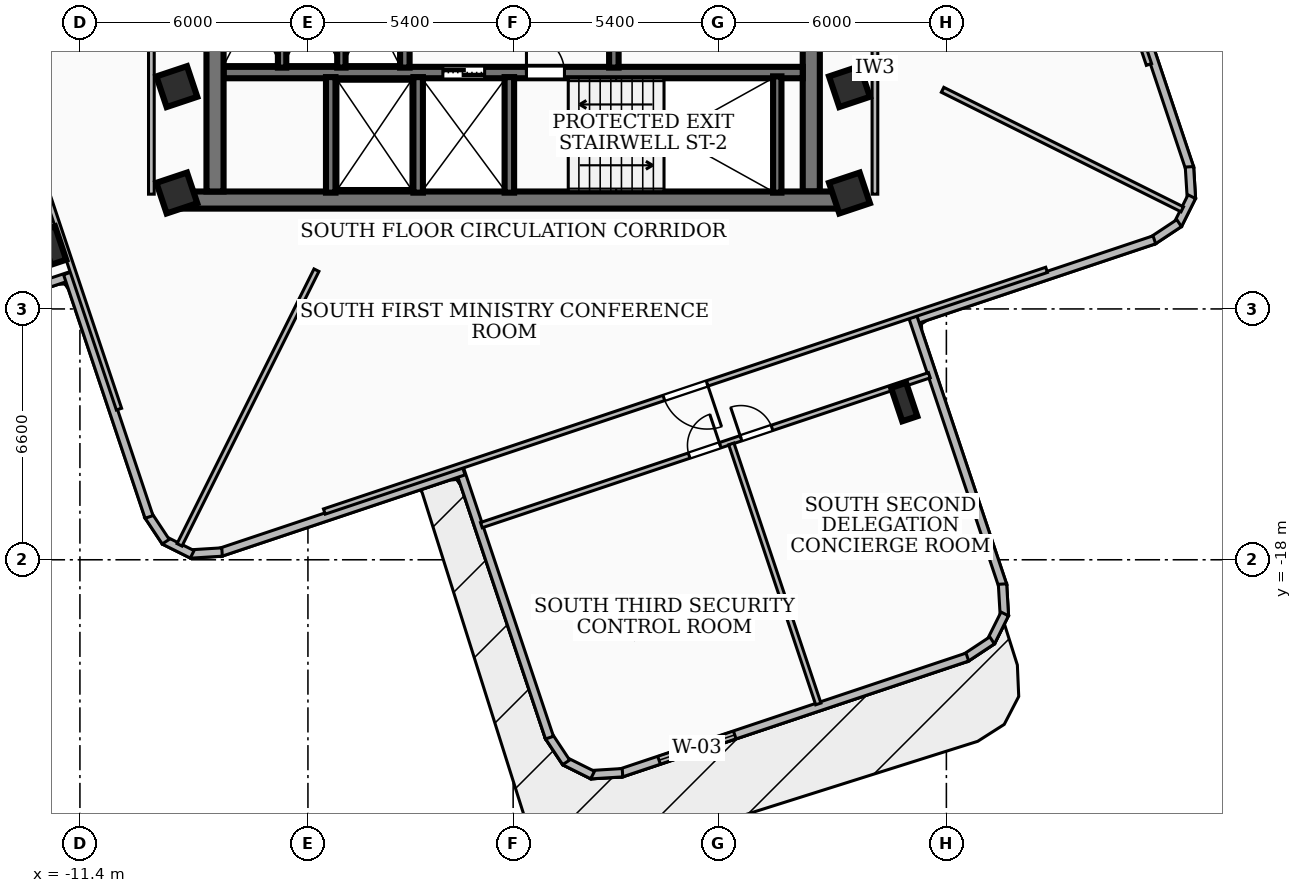
"""IFC4 building model, lengths in metres.
Left out: names, types, materials, properties, quantities, classifications, styles, units other than length and angle.
Written with IfcOpenShell. Run it as: python <this file> out.ifc"""

import sys

from ifc_helpers import new_model, si_unit, direction, frame, frame_2d, origin, origin_2d, place, context, subcontext, project, spatial, rectangle, i_section, extrude, element, fill, save


model = new_model("IFC4")
c1 = context("Model", 3, precision=1e-05, world=origin(), true_north=direction((0.0, 1.0)))
c2 = subcontext(c1, "Body", "Model", "MODEL_VIEW")
j1 = project(units=[si_unit("LENGTHUNIT", "METRE"), si_unit("PLANEANGLEUNIT", "RADIAN")], contexts=[c1])
p1 = place(None, origin())
s1 = spatial("IfcSite", under=j1, at=p1, CompositionType="ELEMENT")
p2 = place(p1, origin())
s2 = spatial("IfcBuilding", under=s1, at=p2, CompositionType="ELEMENT")
p3 = place(p2, frame((0.0, 0.0, 155.88)))
s3 = spatial("IfcBuildingStorey", under=s2, at=p3, CompositionType="ELEMENT", Elevation=155.88)
p4 = place(p3, frame((8.78, -8.535, 0.0), z_axis=(0.0, 0.0, 1.0), x_axis=(-1.0, 0.0, 0.0)))
e1 = element("IfcWall", 1, at=p4, inside=s3, PredefinedType="SHEAR", context=c2, shape_type="SweptSolid", body=[
    extrude(rectangle(XDim=17.56, YDim=0.45, at=frame_2d((8.78, 0.0))), origin(), (0.0, 0.0, 1.0), 3.34),
])
for number, where, z_axis, x_axis in (
    (2, (-7.845, -8.31, 0.0), (0.0, 0.0, 1.0), (0.0, 1.0, 0.0)),
    (3, (7.845, -1.975, 0.0), (0.0, 0.0, 1.0), (0.0, -1.0, 0.0)),
):
    element("IfcWall", number, at=place(p3, frame(where, z_axis=z_axis, x_axis=x_axis)), inside=s3, PredefinedType="SHEAR", context=c2, shape_type="SweptSolid", body=[
        extrude(rectangle(XDim=6.335, YDim=0.45, at=frame_2d((3.167, 0.0))), origin(), (0.0, 0.0, 1.0), 3.34),
    ])
p5 = place(p3, frame((-7.62, -5.18, 0.0), z_axis=(0.0, 0.0, 1.0), x_axis=(1.0, 0.0, 0.0)))
e4 = element("IfcWall", 4, at=p5, inside=s3, PredefinedType="SOLIDWALL", context=c2, shape_type="SweptSolid", body=[
    extrude(rectangle(XDim=15.24, YDim=0.3, at=frame_2d((7.62, 0.0))), origin(), (0.0, 0.0, 1.0), 3.34),
])
p6 = place(p5, frame((5.77, 0.0, 0.0)))
e5 = element("IfcOpeningElement", 5, at=p6, cuts=e4, PredefinedType="OPENING", context=c2, shape_type="SweptSolid", body=[
    extrude(rectangle(XDim=1.1, YDim=2.15, at=frame_2d((0.55, 1.075))), frame((0.0, 0.16, 0.0), z_axis=(0.0, -1.0, 0.0), x_axis=(1.0, 0.0, 0.0)), (0.0, 0.0, 1.0), 0.32),
])
p7 = place(p5, frame((7.97, 0.0, 0.0)))
e6 = element("IfcOpeningElement", 6, at=p7, cuts=e4, PredefinedType="OPENING", context=c2, shape_type="SweptSolid", body=[
    extrude(rectangle(XDim=1.0, YDim=2.1, at=frame_2d((0.5, 1.05))), frame((0.0, 0.16, 0.0), z_axis=(0.0, -1.0, 0.0), x_axis=(1.0, 0.0, 0.0)), (0.0, 0.0, 1.0), 0.32),
])
p8 = place(p3, frame((6.95, -8.34, 0.0), z_axis=(0.0, 0.0, 1.0), x_axis=(0.0, 1.0, 0.0)))
e7 = element("IfcWall", 7, at=p8, inside=s3, PredefinedType="SOLIDWALL", context=c2, shape_type="SweptSolid", body=[
    extrude(rectangle(XDim=3.06, YDim=0.22, at=frame_2d((1.53, 0.0))), origin(), (0.0, 0.0, 1.0), 3.34),
])
for number, where, z_axis, x_axis in (
    (8, (-0.1, -8.34, 0.0), (0.0, 0.0, 1.0), (0.0, 1.0, 0.0)),
    (9, (-2.5, -8.34, 0.0), (0.0, 0.0, 1.0), (0.0, 1.0, 0.0)),
    (10, (-4.8, -8.34, 0.0), (0.0, 0.0, 1.0), (0.0, 1.0, 0.0)),
):
    element("IfcWall", number, at=place(p3, frame(where, z_axis=z_axis, x_axis=x_axis)), inside=s3, PredefinedType="SOLIDWALL", context=c2, shape_type="SweptSolid", body=[
        extrude(rectangle(XDim=3.04, YDim=0.25, at=frame_2d((1.52, 0.0))), origin(), (0.0, 0.0, 1.0), 3.34),
    ])
for number, where, z_axis, x_axis in (
    (11, (-2.85, -5.05, 0.0), (0.0, 0.0, 1.0), (0.0, 1.0, 0.0)),
    (12, (2.65, -5.05, 0.0), (0.0, 0.0, 1.0), (0.0, 1.0, 0.0)),
):
    element("IfcWall", number, at=place(p3, frame(where, z_axis=z_axis, x_axis=x_axis)), inside=s3, PredefinedType="SOLIDWALL", context=c2, shape_type="SweptSolid", body=[
        extrude(rectangle(XDim=3.07, YDim=0.25, at=frame_2d((1.535, 0.0))), origin(), (0.0, 0.0, 1.0), 3.34),
    ])
for number, where, z_axis, x_axis in (
    (13, (-6.08, -5.05, 0.0), (0.0, 0.0, 1.0), (0.0, 1.0, 0.0)),
    (14, (-4.52, -5.05, 0.0), (0.0, 0.0, 1.0), (0.0, 1.0, 0.0)),
):
    element("IfcWall", number, at=place(p3, frame(where, z_axis=z_axis, x_axis=x_axis)), inside=s3, PredefinedType="SOLIDWALL", context=c2, shape_type="SweptSolid", body=[
        extrude(rectangle(XDim=3.07, YDim=0.22, at=frame_2d((1.535, 0.0))), origin(), (0.0, 0.0, 1.0), 3.34),
    ])
for number, where, z_axis, x_axis in (
    (15, (-8.85, -5.55, 0.0), (0.0, 0.0, 1.0), (0.948, 0.317, 0.0)),
    (16, (8.85, -5.55, 0.0), (0.0, 0.0, 1.0), (0.948, 0.317, 0.0)),
    (17, (8.85, -8.35, 0.0), (0.0, 0.0, 1.0), (0.948, 0.317, 0.0)),
    (18, (-8.85, -8.35, 0.0), (0.0, 0.0, 1.0), (0.948, 0.317, 0.0)),
):
    element("IfcColumn", number, at=place(p3, frame(where, z_axis=z_axis, x_axis=x_axis)), inside=s3, PredefinedType="COLUMN", context=c2, shape_type="SweptSolid", body=[
        extrude(rectangle(XDim=0.85, YDim=0.85, at=origin_2d()), origin(), (0.0, 0.0, 1.0), 3.6),
    ])
for number, where, z_axis, x_axis in (
    (19, (-12.106, -9.731, 0.0), (0.0, 0.0, 1.0), (0.948, 0.317, 0.0)),
    (20, (3.29, -19.536, 0.0), (0.0, 0.0, 1.0), (0.948, 0.317, 0.0)),
    (21, (10.29, -13.85, 0.0), (0.0, 0.0, 1.0), (0.948, 0.317, 0.0)),
):
    element("IfcColumn", number, at=place(p3, frame(where, z_axis=z_axis, x_axis=x_axis)), inside=s3, PredefinedType="COLUMN", context=c2, shape_type="SweptSolid", body=[
        extrude(i_section(OverallWidth=0.418, OverallDepth=0.927, WebThickness=0.019, FlangeThickness=0.032, at=origin_2d()), origin(), (0.0, 0.0, 1.0), 3.6),
    ])
p9 = place(p3, frame((-11.615, -10.519, 0.0), z_axis=(0.0, 0.0, 1.0), x_axis=(-0.948329626758, -0.317286808759, 0.0)))
e22 = element("IfcWall", 22, at=p9, inside=s3, PredefinedType="SOLIDWALL", context=c2, shape_type="SweptSolid", body=[
    extrude(rectangle(XDim=9.058, YDim=0.22, at=frame_2d((4.529, 0.0))), origin(), (0.0, 0.0, 1.0), 3.34),
])
p10 = place(p9, frame((5.258, 0.0, 0.85)))
e23 = element("IfcOpeningElement", 23, at=p10, cuts=e22, PredefinedType="OPENING", context=c2, shape_type="SweptSolid", body=[
    extrude(rectangle(XDim=2.7, YDim=2.1, at=frame_2d((1.35, 1.05))), frame((0.0, 0.12, 0.0), z_axis=(0.0, -1.0, 0.0), x_axis=(1.0, 0.0, 0.0)), (0.0, 0.0, 1.0), 0.24),
])
p11 = place(p3, frame((15.662, -1.3, 0.0), z_axis=(0.0, 0.0, 1.0), x_axis=(0.317224676093, -0.948350412494, 0.0)))
e24 = element("IfcWall", 24, at=p11, inside=s3, PredefinedType="SOLIDWALL", context=c2, shape_type="SweptSolid", body=[
    extrude(rectangle(XDim=6.758, YDim=0.22, at=frame_2d((3.379, 0.0))), origin(), (0.0, 0.0, 1.0), 3.34),
])
p12 = place(p3, frame((17.796, -7.66, 0.0), z_axis=(0.0, 0.0, 1.0), x_axis=(0.062305442082, -0.998057128569, 0.0)))
e25 = element("IfcWall", 25, at=p12, inside=s3, PredefinedType="SOLIDWALL", context=c2, shape_type="SweptSolid", body=[
    extrude(rectangle(XDim=0.835, YDim=0.22, at=frame_2d((0.417, 0.0))), origin(), (0.0, 0.0, 1.0), 3.34),
])
p13 = place(p3, frame((17.857, -8.446, 0.0), z_axis=(0.0, 0.0, 1.0), x_axis=(-0.446258139106, -0.894904281631, 0.0)))
e26 = element("IfcWall", 26, at=p13, inside=s3, PredefinedType="SOLIDWALL", context=c2, shape_type="SweptSolid", body=[
    extrude(rectangle(XDim=0.818, YDim=0.22, at=frame_2d((0.409, 0.0))), origin(), (0.0, 0.0, 1.0), 3.34),
])
p14 = place(p3, frame((17.524, -9.142, 0.0), z_axis=(0.0, 0.0, 1.0), x_axis=(-0.833756011094, -0.552133058206, 0.0)))
e27 = element("IfcWall", 27, at=p14, inside=s3, PredefinedType="SOLIDWALL", context=c2, shape_type="SweptSolid", body=[
    extrude(rectangle(XDim=0.835, YDim=0.22, at=frame_2d((0.417, 0.0))), origin(), (0.0, 0.0, 1.0), 3.34),
])
p15 = place(p3, frame((16.873, -9.581, 0.0), z_axis=(0.0, 0.0, 1.0), x_axis=(-0.94829606055, -0.317387116224, 0.0)))
e28 = element("IfcWall", 28, at=p15, inside=s3, PredefinedType="SOLIDWALL", context=c2, shape_type="SweptSolid", body=[
    extrude(rectangle(XDim=6.758, YDim=0.22, at=frame_2d((3.379, 0.0))), origin(), (0.0, 0.0, 1.0), 3.34),
])
p16 = place(p3, frame((10.519, -11.615, 0.0), z_axis=(0.0, 0.0, 1.0), x_axis=(0.317347016501, -0.948309480664, 0.0)))
e29 = element("IfcWall", 29, at=p16, inside=s3, PredefinedType="SOLIDWALL", context=c2, shape_type="SweptSolid", body=[
    extrude(rectangle(XDim=7.458, YDim=0.22, at=frame_2d((3.729, 0.0))), origin(), (0.0, 0.0, 1.0), 3.34),
])
p17 = place(p3, frame((12.877, -18.639, 0.0), z_axis=(0.0, 0.0, 1.0), x_axis=(0.05880777677, -0.998269325078, 0.0)))
e30 = element("IfcWall", 30, at=p17, inside=s3, PredefinedType="SOLIDWALL", context=c2, shape_type="SweptSolid", body=[
    extrude(rectangle(XDim=0.834, YDim=0.22, at=frame_2d((0.417, 0.0))), origin(), (0.0, 0.0, 1.0), 3.34),
])
p18 = place(p3, frame((12.936, -19.425, 0.0), z_axis=(0.0, 0.0, 1.0), x_axis=(-0.446258139106, -0.894904281631, 0.0)))
e31 = element("IfcWall", 31, at=p18, inside=s3, PredefinedType="SOLIDWALL", context=c2, shape_type="SweptSolid", body=[
    extrude(rectangle(XDim=0.818, YDim=0.22, at=frame_2d((0.409, 0.0))), origin(), (0.0, 0.0, 1.0), 3.34),
])
p19 = place(p3, frame((12.603, -20.121, 0.0), z_axis=(0.0, 0.0, 1.0), x_axis=(-0.833756011094, -0.552133058206, 0.0)))
e32 = element("IfcWall", 32, at=p19, inside=s3, PredefinedType="SOLIDWALL", context=c2, shape_type="SweptSolid", body=[
    extrude(rectangle(XDim=0.835, YDim=0.22, at=frame_2d((0.417, 0.0))), origin(), (0.0, 0.0, 1.0), 3.34),
])
p20 = place(p3, frame((11.952, -20.56, 0.0), z_axis=(0.0, 0.0, 1.0), x_axis=(-0.94831980895, -0.317316151421, 0.0)))
e33 = element("IfcWall", 33, at=p20, inside=s3, PredefinedType="SOLIDWALL", context=c2, shape_type="SweptSolid", body=[
    extrude(rectangle(XDim=9.621, YDim=0.22, at=frame_2d((4.811, 0.0))), origin(), (0.0, 0.0, 1.0), 3.34),
])
p21 = place(p20, frame((6.455, 0.0, 0.85)))
e34 = element("IfcOpeningElement", 34, at=p21, cuts=e33, PredefinedType="OPENING", context=c2, shape_type="SweptSolid", body=[
    extrude(rectangle(XDim=2.1, YDim=2.0, at=frame_2d((1.05, 1.0))), frame((0.0, 0.12, 0.0), z_axis=(0.0, -1.0, 0.0), x_axis=(1.0, 0.0, 0.0)), (0.0, 0.0, 1.0), 0.24),
])
p22 = place(p3, frame((2.877, -23.603, 0.0), z_axis=(0.0, 0.0, 1.0), x_axis=(-0.998057128569, -0.062305442082, 0.0)))
e35 = element("IfcWall", 35, at=p22, inside=s3, PredefinedType="SOLIDWALL", context=c2, shape_type="SweptSolid", body=[
    extrude(rectangle(XDim=0.835, YDim=0.22, at=frame_2d((0.417, 0.0))), origin(), (0.0, 0.0, 1.0), 3.34),
])
p23 = place(p3, frame((2.091, -23.664, 0.0), z_axis=(0.0, 0.0, 1.0), x_axis=(-0.894963703084, 0.446138958356, 0.0)))
e36 = element("IfcWall", 36, at=p23, inside=s3, PredefinedType="SOLIDWALL", context=c2, shape_type="SweptSolid", body=[
    extrude(rectangle(XDim=0.818, YDim=0.22, at=frame_2d((0.409, 0.0))), origin(), (0.0, 0.0, 1.0), 3.34),
])
p24 = place(p3, frame((1.395, -23.331, 0.0), z_axis=(0.0, 0.0, 1.0), x_axis=(-0.552133058206, 0.833756011094, 0.0)))
e37 = element("IfcWall", 37, at=p24, inside=s3, PredefinedType="SOLIDWALL", context=c2, shape_type="SweptSolid", body=[
    extrude(rectangle(XDim=0.835, YDim=0.22, at=frame_2d((0.417, 0.0))), origin(), (0.0, 0.0, 1.0), 3.34),
])
p25 = place(p3, frame((0.956, -22.68, 0.0), z_axis=(0.0, 0.0, 1.0), x_axis=(-0.317347016501, 0.948309480664, 0.0)))
e38 = element("IfcWall", 38, at=p25, inside=s3, PredefinedType="SOLIDWALL", context=c2, shape_type="SweptSolid", body=[
    extrude(rectangle(XDim=7.458, YDim=0.22, at=frame_2d((3.729, 0.0))), origin(), (0.0, 0.0, 1.0), 3.34),
])
p26 = place(p3, frame((-1.3, -15.662, 0.0), z_axis=(0.0, 0.0, 1.0), x_axis=(-0.948350412494, -0.317224676093, 0.0)))
e39 = element("IfcWall", 39, at=p26, inside=s3, PredefinedType="SOLIDWALL", context=c2, shape_type="SweptSolid", body=[
    extrude(rectangle(XDim=6.758, YDim=0.22, at=frame_2d((3.379, 0.0))), origin(), (0.0, 0.0, 1.0), 3.34),
])
p27 = place(p3, frame((-7.66, -17.796, 0.0), z_axis=(0.0, 0.0, 1.0), x_axis=(-0.998057128569, -0.062305442082, 0.0)))
e40 = element("IfcWall", 40, at=p27, inside=s3, PredefinedType="SOLIDWALL", context=c2, shape_type="SweptSolid", body=[
    extrude(rectangle(XDim=0.835, YDim=0.22, at=frame_2d((0.417, 0.0))), origin(), (0.0, 0.0, 1.0), 3.34),
])
p28 = place(p3, frame((-8.446, -17.857, 0.0), z_axis=(0.0, 0.0, 1.0), x_axis=(-0.894904281631, 0.446258139106, 0.0)))
e41 = element("IfcWall", 41, at=p28, inside=s3, PredefinedType="SOLIDWALL", context=c2, shape_type="SweptSolid", body=[
    extrude(rectangle(XDim=0.818, YDim=0.22, at=frame_2d((0.409, 0.0))), origin(), (0.0, 0.0, 1.0), 3.34),
])
p29 = place(p3, frame((-9.142, -17.524, 0.0), z_axis=(0.0, 0.0, 1.0), x_axis=(-0.552133058206, 0.833756011094, 0.0)))
e42 = element("IfcWall", 42, at=p29, inside=s3, PredefinedType="SOLIDWALL", context=c2, shape_type="SweptSolid", body=[
    extrude(rectangle(XDim=0.835, YDim=0.22, at=frame_2d((0.417, 0.0))), origin(), (0.0, 0.0, 1.0), 3.34),
])
p30 = place(p3, frame((-9.581, -16.873, 0.0), z_axis=(0.0, 0.0, 1.0), x_axis=(-0.317387116224, 0.94829606055, 0.0)))
e43 = element("IfcWall", 43, at=p30, inside=s3, PredefinedType="SOLIDWALL", context=c2, shape_type="SweptSolid", body=[
    extrude(rectangle(XDim=6.758, YDim=0.22, at=frame_2d((3.379, 0.0))), origin(), (0.0, 0.0, 1.0), 3.34),
])
p31 = place(p3, frame((-9.52, -8.38, 0.0), z_axis=(0.0, 0.0, 1.0), x_axis=(0.0, 1.0, 0.0)))
e44 = element("IfcWall", 44, at=p31, inside=s3, PredefinedType="PARTITIONING", context=c2, shape_type="SweptSolid", body=[
    extrude(rectangle(XDim=6.63, YDim=0.15, at=frame_2d((3.315, 0.0))), origin(), (0.0, 0.0, 1.0), 2.644),
])
p32 = place(p3, frame((9.52, -8.38, 0.0), z_axis=(0.0, 0.0, 1.0), x_axis=(0.0, 1.0, 0.0)))
e45 = element("IfcWall", 45, at=p32, inside=s3, PredefinedType="PARTITIONING", context=c2, shape_type="SweptSolid", body=[
    extrude(rectangle(XDim=6.63, YDim=0.15, at=frame_2d((3.315, 0.0))), origin(), (0.0, 0.0, 1.0), 3.34),
])
p33 = place(p3, frame((-5.176, -10.38, 0.0), z_axis=(0.0, 0.0, 1.0), x_axis=(-0.446173290391, -0.894946587759, 0.0)))
e46 = element("IfcWall", 46, at=p33, inside=s3, PredefinedType="PARTITIONING", context=c2, shape_type="SweptSolid", body=[
    extrude(rectangle(XDim=8.075, YDim=0.145, at=frame_2d((4.038, 0.0))), origin(), (0.0, 0.0, 1.0), 3.34),
])
p34 = place(p3, frame((11.3, -5.634, 0.0), z_axis=(0.0, 0.0, 1.0), x_axis=(0.894904738475, -0.446257222972, 0.0)))
e47 = element("IfcWall", 47, at=p34, inside=s3, PredefinedType="PARTITIONING", context=c2, shape_type="SweptSolid", body=[
    extrude(rectangle(XDim=7.048, YDim=0.145, at=frame_2d((3.524, 0.0))), origin(), (0.0, 0.0, 1.0), 3.34),
])
p35 = place(p3, frame((10.372, 14.037, 0.0), z_axis=(0.0, 0.0, 1.0), x_axis=(0.317298382655, -0.94832575435, 0.0)))
e48 = element("IfcWall", 48, at=p35, inside=s3, PredefinedType="PARTITIONING", context=c2, shape_type="SweptSolid", body=[
    extrude(rectangle(XDim=20.041, YDim=0.145, at=frame_2d((10.021, 0.0))), origin(), (0.0, 0.0, 1.0), 2.644),
])
p36 = place(p35, frame((9.42, 0.0, 0.0)))
e49 = element("IfcOpeningElement", 49, at=p36, cuts=e48, PredefinedType="OPENING", context=c2, shape_type="SweptSolid", body=[
    extrude(rectangle(XDim=1.2, YDim=2.1, at=frame_2d((0.6, 1.05))), frame((0.0, 0.083, 0.0), z_axis=(0.0, -1.0, 0.0), x_axis=(1.0, 0.0, 0.0)), (0.0, 0.0, 1.0), 0.165),
])
p37 = place(p3, frame((-10.372, -14.037, 0.0), z_axis=(0.0, 0.0, 1.0), x_axis=(-0.317298382655, 0.94832575435, 0.0)))
e50 = element("IfcWall", 50, at=p37, inside=s3, PredefinedType="PARTITIONING", context=c2, shape_type="SweptSolid", body=[
    extrude(rectangle(XDim=20.041, YDim=0.145, at=frame_2d((10.021, 0.0))), origin(), (0.0, 0.0, 1.0), 2.644),
])
p38 = place(p37, frame((9.42, 0.0, 0.0)))
e51 = element("IfcOpeningElement", 51, at=p38, cuts=e50, PredefinedType="OPENING", context=c2, shape_type="SweptSolid", body=[
    extrude(rectangle(XDim=1.2, YDim=2.1, at=frame_2d((0.6, 1.05))), frame((0.0, 0.083, 0.0), z_axis=(0.0, -1.0, 0.0), x_axis=(1.0, 0.0, 0.0)), (0.0, 0.0, 1.0), 0.165),
])
p39 = place(p3, frame((14.037, -10.372, 0.0), z_axis=(0.0, 0.0, 1.0), x_axis=(-0.94832575435, -0.317298382655, 0.0)))
e52 = element("IfcWall", 52, at=p39, inside=s3, PredefinedType="PARTITIONING", context=c2, shape_type="SweptSolid", body=[
    extrude(rectangle(XDim=20.041, YDim=0.145, at=frame_2d((10.021, 0.0))), origin(), (0.0, 0.0, 1.0), 2.644),
])
p40 = place(p39, frame((9.42, 0.0, 0.0)))
e53 = element("IfcOpeningElement", 53, at=p40, cuts=e52, PredefinedType="OPENING", context=c2, shape_type="SweptSolid", body=[
    extrude(rectangle(XDim=1.2, YDim=2.1, at=frame_2d((0.6, 1.05))), frame((0.0, 0.083, 0.0), z_axis=(0.0, -1.0, 0.0), x_axis=(1.0, 0.0, 0.0)), (0.0, 0.0, 1.0), 0.165),
])
p41 = place(p3, frame((5.741, -14.951, 0.0), z_axis=(0.0, 0.0, 1.0), x_axis=(0.317273194857, -0.948334181513, 0.0)))
e54 = element("IfcWall", 54, at=p41, inside=s3, PredefinedType="PARTITIONING", context=c2, shape_type="SweptSolid", body=[
    extrude(rectangle(XDim=7.215, YDim=0.145, at=frame_2d((3.607, 0.0))), origin(), (0.0, 0.0, 1.0), 3.34),
])
p42 = place(p3, frame((-0.836, -17.088, 0.0), z_axis=(0.0, 0.0, 1.0), x_axis=(0.948331136084, 0.317282297544, 0.0)))
e55 = element("IfcWall", 55, at=p42, inside=s3, PredefinedType="PARTITIONING", context=c2, shape_type="SweptSolid", body=[
    extrude(rectangle(XDim=12.43, YDim=0.145, at=frame_2d((6.215, 0.0))), origin(), (0.0, 0.0, 1.0), 2.644),
])
p43 = place(p42, frame((5.765, 0.0, 0.0)))
e56 = element("IfcOpeningElement", 56, at=p43, cuts=e55, PredefinedType="OPENING", context=c2, shape_type="SweptSolid", body=[
    extrude(rectangle(XDim=0.86, YDim=2.04, at=frame_2d((0.43, 1.02))), frame((0.0, 0.083, 0.0), z_axis=(0.0, -1.0, 0.0), x_axis=(1.0, 0.0, 0.0)), (0.0, 0.0, 1.0), 0.165),
])
p44 = place(p42, frame((7.204, 0.0, 0.0)))
e57 = element("IfcOpeningElement", 57, at=p44, cuts=e55, PredefinedType="OPENING", context=c2, shape_type="SweptSolid", body=[
    extrude(rectangle(XDim=0.86, YDim=2.04, at=frame_2d((0.43, 1.02))), frame((0.0, 0.083, 0.0), z_axis=(0.0, -1.0, 0.0), x_axis=(1.0, 0.0, 0.0)), (0.0, 0.0, 1.0), 0.165),
])
p45 = place(p21, origin())
e58 = element("IfcWindow", 58, at=p45, inside=s3, PartitioningType="SINGLE_PANEL", PredefinedType="WINDOW", context=c2, shape_type="SweptSolid", body=[
    extrude(rectangle(XDim=2.1, YDim=2.0, at=frame_2d((1.05, 1.0))), frame((0.0, 0.03, 0.0), z_axis=(0.0, -1.0, 0.0), x_axis=(1.0, 0.0, 0.0)), (0.0, 0.0, 1.0), 0.06),
])
fill(e34, e58)
p46 = place(p6, origin())
e59 = element("IfcDoor", 59, at=p46, inside=s3, OperationType="DOUBLE_DOOR_SLIDING", PredefinedType="DOOR", context=c2, shape_type="SweptSolid", body=[
    extrude(rectangle(XDim=1.1, YDim=2.15, at=frame_2d((0.55, 1.075))), frame((0.0, 0.025, 0.0), z_axis=(0.0, -1.0, 0.0), x_axis=(1.0, 0.0, 0.0)), (0.0, 0.0, 1.0), 0.05),
])
fill(e5, e59)
p47 = place(p7, origin())
e60 = element("IfcDoor", 60, at=p47, inside=s3, OperationType="SINGLE_SWING_LEFT", PredefinedType="DOOR", context=c2, shape_type="SweptSolid", body=[
    extrude(rectangle(XDim=1.0, YDim=2.1, at=frame_2d((0.5, 1.05))), frame((0.0, 0.025, 0.0), z_axis=(0.0, -1.0, 0.0), x_axis=(1.0, 0.0, 0.0)), (0.0, 0.0, 1.0), 0.05),
])
fill(e6, e60)
p48 = place(p40, origin())
e61 = element("IfcDoor", 61, at=p48, inside=s3, OperationType="SINGLE_SWING_LEFT", PredefinedType="DOOR", context=c2, shape_type="SweptSolid", body=[
    extrude(rectangle(XDim=1.2, YDim=2.1, at=frame_2d((0.6, 1.05))), frame((0.0, 0.025, 0.0), z_axis=(0.0, -1.0, 0.0), x_axis=(1.0, 0.0, 0.0)), (0.0, 0.0, 1.0), 0.05),
])
fill(e53, e61)
p49 = place(p43, origin())
e62 = element("IfcDoor", 62, at=p49, inside=s3, OperationType="SINGLE_SWING_RIGHT", PredefinedType="DOOR", context=c2, shape_type="SweptSolid", body=[
    extrude(rectangle(XDim=0.86, YDim=2.04, at=frame_2d((0.43, 1.02))), frame((0.0, 0.025, 0.0), z_axis=(0.0, -1.0, 0.0), x_axis=(1.0, 0.0, 0.0)), (0.0, 0.0, 1.0), 0.05),
])
fill(e56, e62)
p50 = place(p44, origin())
e63 = element("IfcDoor", 63, at=p50, inside=s3, OperationType="SINGLE_SWING_LEFT", PredefinedType="DOOR", context=c2, shape_type="SweptSolid", body=[
    extrude(rectangle(XDim=0.86, YDim=2.04, at=frame_2d((0.43, 1.02))), frame((0.0, 0.025, 0.0), z_axis=(0.0, -1.0, 0.0), x_axis=(1.0, 0.0, 0.0)), (0.0, 0.0, 1.0), 0.05),
])
fill(e57, e63)
save(model, sys.argv[1])
